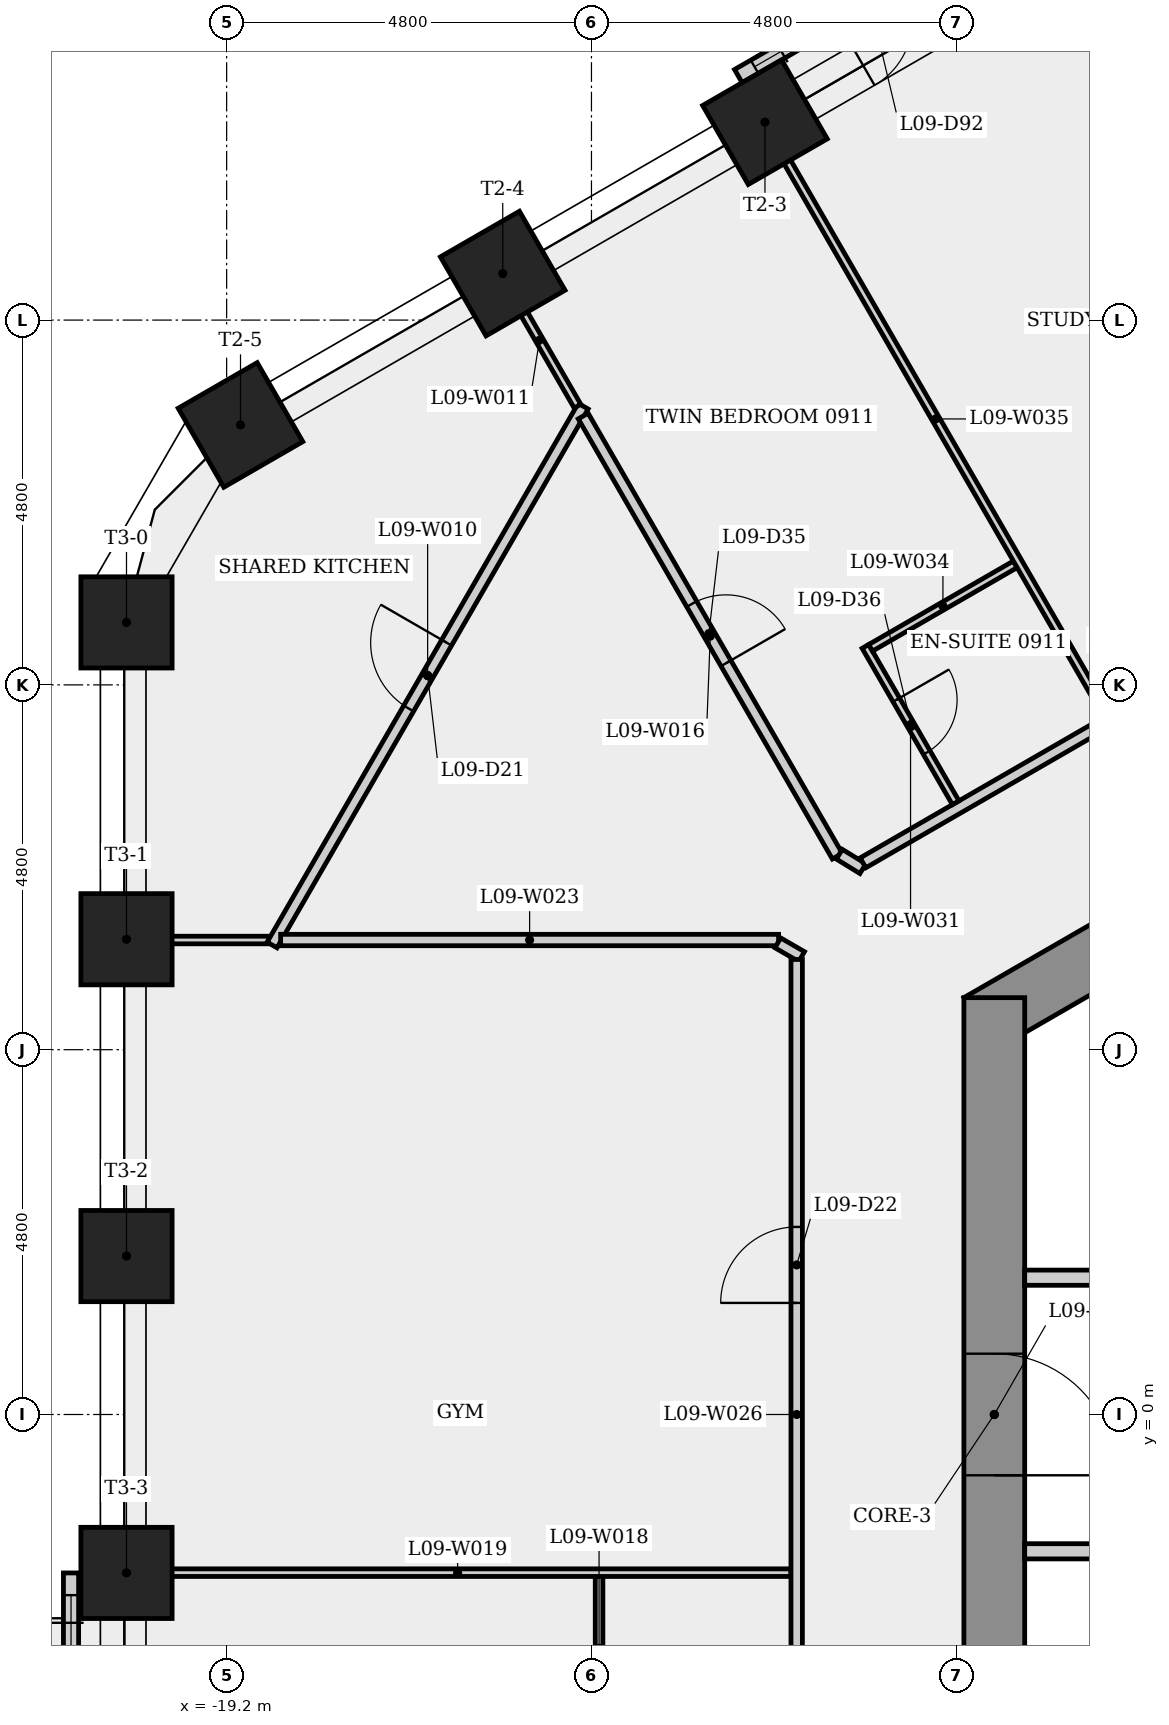
"""IFC4 building model, lengths in metres.
Left out: names, types, materials, properties, quantities, classifications, styles, units other than length and angle.
Written with IfcOpenShell. Run it as: python <this file> out.ifc"""

import sys

from ifc_helpers import new_model, si_unit, direction, frame, frame_2d, origin, origin_2d, place, context, subcontext, project, spatial, rectangle, extrude, element, fill, save


model = new_model("IFC4")
c1 = context("Model", 3, precision=1e-05, world=origin(), true_north=direction((0.0, 1.0)))
c2 = subcontext(c1, "Body", "Model", "MODEL_VIEW")
j1 = project(units=[si_unit("LENGTHUNIT", "METRE"), si_unit("PLANEANGLEUNIT", "RADIAN")], contexts=[c1])
p1 = place(None, origin())
s1 = spatial("IfcSite", under=j1, at=p1, CompositionType="ELEMENT")
p2 = place(p1, origin())
s2 = spatial("IfcBuilding", under=s1, at=p2, CompositionType="ELEMENT")
p3 = place(p2, frame((0.0, 0.0, 39.1)))
s3 = spatial("IfcBuildingStorey", under=s2, at=p3, CompositionType="ELEMENT", Elevation=39.1)
p4 = place(p3, frame((0.2, 10.623, 0.0), z_axis=(0.0, 0.0, 1.0), x_axis=(-0.866023993627, -0.500002442456, 0.0)))
e1 = element("IfcWall", 1, at=p4, inside=s3, PredefinedType="SHEAR", context=c2, shape_type="SweptSolid", body=[
    extrude(rectangle(XDim=10.97, YDim=0.8, at=frame_2d((5.485, 0.0))), origin(), (0.0, 0.0, 1.0), 3.4),
])
p5 = place(p4, frame((6.185, 0.0, 0.0)))
e2 = element("IfcOpeningElement", 2, at=p5, cuts=e1, PredefinedType="OPENING", context=c2, shape_type="SweptSolid", body=[
    extrude(rectangle(XDim=0.9, YDim=2.1, at=frame_2d((0.45, 1.05))), frame((0.0, 0.41, 0.0), z_axis=(0.0, -1.0, 0.0), x_axis=(1.0, 0.0, 0.0)), (0.0, 0.0, 1.0), 0.82),
])
p6 = place(p3, frame((-9.1, 5.485, 0.0), z_axis=(0.0, 0.0, 1.0), x_axis=(0.0, -1.0, 0.0)))
e3 = element("IfcWall", 3, at=p6, inside=s3, PredefinedType="SHEAR", context=c2, shape_type="SweptSolid", body=[
    extrude(rectangle(XDim=10.97, YDim=0.8, at=frame_2d((5.485, 0.0))), origin(), (0.0, 0.0, 1.0), 3.4),
])
p7 = place(p6, frame((4.685, 0.0, 0.0)))
e4 = element("IfcOpeningElement", 4, at=p7, cuts=e3, PredefinedType="OPENING", context=c2, shape_type="SweptSolid", body=[
    extrude(rectangle(XDim=1.6, YDim=2.1, at=frame_2d((0.8, 1.05))), frame((0.0, 0.41, 0.0), z_axis=(0.0, -1.0, 0.0), x_axis=(1.0, 0.0, 0.0)), (0.0, 0.0, 1.0), 0.82),
])
for number, where, z_axis, x_axis in (
    (5, (-12.117, 17.004, 0.0), (0.0, 0.0, 1.0), (-0.5, 0.866, 0.0)),
    (6, (-15.567, 15.012, 0.0), (0.0, 0.0, 1.0), (-0.5, 0.866, 0.0)),
    (7, (-19.018, 13.02, 0.0), (0.0, 0.0, 1.0), (-0.5, 0.866, 0.0)),
    (8, (-20.518, 10.422, 0.0), (0.0, 0.0, 1.0), (-1.0, 0.0, 0.0)),
    (9, (-20.518, 6.253, 0.0), (0.0, 0.0, 1.0), (-1.0, 0.0, 0.0)),
    (10, (-20.518, 2.084, 0.0), (0.0, 0.0, 1.0), (-1.0, 0.0, 0.0)),
    (11, (-20.518, -2.084, 0.0), (0.0, 0.0, 1.0), (-1.0, 0.0, 0.0)),
):
    element("IfcColumn", number, at=place(p3, frame(where, z_axis=z_axis, x_axis=x_axis)), inside=s3, PredefinedType="COLUMN", context=c2, shape_type="SweptSolid", body=[
        extrude(rectangle(XDim=1.2, YDim=1.2, at=origin_2d()), origin(), (0.0, 0.0, 1.0), 3.4),
    ])
p8 = place(p3, frame((-9.017, 19.602, 0.0), z_axis=(0.0, 0.0, 1.0), x_axis=(-0.866017214255, -0.500014184414, 0.0)))
e12 = element("IfcWall", 12, at=p8, inside=s3, PredefinedType="SOLIDWALL", context=c2, shape_type="SweptSolid", body=[
    extrude(rectangle(XDim=3.984, YDim=0.2, at=frame_2d((1.992, 0.0))), origin(), (0.0, 0.0, 1.0), 3.4),
])
p9 = place(p8, frame((1.492, 0.0, 0.0)))
e13 = element("IfcOpeningElement", 13, at=p9, cuts=e12, PredefinedType="OPENING", context=c2, shape_type="SweptSolid", body=[
    extrude(rectangle(XDim=1.0, YDim=2.4, at=frame_2d((0.5, 1.2))), frame((0.0, 0.11, 0.0), z_axis=(0.0, -1.0, 0.0), x_axis=(1.0, 0.0, 0.0)), (0.0, 0.0, 1.0), 0.22),
])
p10 = place(p8, frame((0.246, 0.0, 0.9)))
e14 = element("IfcOpeningElement", 14, at=p10, cuts=e12, PredefinedType="OPENING", context=c2, shape_type="SweptSolid", body=[
    extrude(rectangle(XDim=1.0, YDim=1.5, at=frame_2d((0.5, 0.75))), frame((0.0, 0.11, 0.0), z_axis=(0.0, -1.0, 0.0), x_axis=(1.0, 0.0, 0.0)), (0.0, 0.0, 1.0), 0.22),
])
p11 = place(p8, frame((2.738, 0.0, 0.9)))
e15 = element("IfcOpeningElement", 15, at=p11, cuts=e12, PredefinedType="OPENING", context=c2, shape_type="SweptSolid", body=[
    extrude(rectangle(XDim=1.0, YDim=1.5, at=frame_2d((0.5, 0.75))), frame((0.0, 0.11, 0.0), z_axis=(0.0, -1.0, 0.0), x_axis=(1.0, 0.0, 0.0)), (0.0, 0.0, 1.0), 0.22),
])
p12 = place(p3, frame((-21.247, -2.085, 0.0), z_axis=(0.0, 0.0, 1.0), x_axis=(0.0, -1.0, 0.0)))
e16 = element("IfcWall", 16, at=p12, inside=s3, PredefinedType="SOLIDWALL", context=c2, shape_type="SweptSolid", body=[
    extrude(rectangle(XDim=4.168, YDim=0.2, at=frame_2d((2.084, 0.0))), origin(), (0.0, 0.0, 1.0), 3.4),
])
p13 = place(p12, frame((1.584, 0.0, 0.0)))
e17 = element("IfcOpeningElement", 17, at=p13, cuts=e16, PredefinedType="OPENING", context=c2, shape_type="SweptSolid", body=[
    extrude(rectangle(XDim=1.0, YDim=2.4, at=frame_2d((0.5, 1.2))), frame((0.0, 0.11, 0.0), z_axis=(0.0, -1.0, 0.0), x_axis=(1.0, 0.0, 0.0)), (0.0, 0.0, 1.0), 0.22),
])
p14 = place(p12, frame((0.292, 0.0, 0.9)))
e18 = element("IfcOpeningElement", 18, at=p14, cuts=e16, PredefinedType="OPENING", context=c2, shape_type="SweptSolid", body=[
    extrude(rectangle(XDim=1.0, YDim=1.5, at=frame_2d((0.5, 0.75))), frame((0.0, 0.11, 0.0), z_axis=(0.0, -1.0, 0.0), x_axis=(1.0, 0.0, 0.0)), (0.0, 0.0, 1.0), 0.22),
])
p15 = place(p12, frame((2.876, 0.0, 0.9)))
e19 = element("IfcOpeningElement", 19, at=p15, cuts=e16, PredefinedType="OPENING", context=c2, shape_type="SweptSolid", body=[
    extrude(rectangle(XDim=1.0, YDim=1.5, at=frame_2d((0.5, 0.75))), frame((0.0, 0.11, 0.0), z_axis=(0.0, -1.0, 0.0), x_axis=(1.0, 0.0, 0.0)), (0.0, 0.0, 1.0), 0.22),
])
p16 = place(p3, frame((-18.639, 6.243, 0.0), z_axis=(0.0, 0.0, 1.0), x_axis=(-1.0, 0.0, 0.0)))
e20 = element("IfcWall", 20, at=p16, inside=s3, PredefinedType="PARTITIONING", context=c2, shape_type="SweptSolid", body=[
    extrude(rectangle(XDim=1.908, YDim=0.1, at=frame_2d((0.954, 0.0))), origin(), (0.0, 0.0, 1.0), 3.05),
])
p17 = place(p3, frame((-18.602, 6.178, 0.0), z_axis=(0.0, 0.0, 1.0), x_axis=(0.500007281186, 0.866021199949, 0.0)))
e21 = element("IfcWall", 21, at=p17, inside=s3, PredefinedType="PARTITIONING", context=c2, shape_type="SweptSolid", body=[
    extrude(rectangle(XDim=8.187, YDim=0.15, at=frame_2d((4.093, 0.0))), origin(), (0.0, 0.0, 1.0), 3.05),
])
p18 = place(p17, frame((3.593, 0.0, 0.0)))
e22 = element("IfcOpeningElement", 22, at=p18, cuts=e21, PredefinedType="OPENING", context=c2, shape_type="SweptSolid", body=[
    extrude(rectangle(XDim=1.0, YDim=2.1, at=frame_2d((0.5, 1.05))), frame((0.0, 0.085, 0.0), z_axis=(0.0, -1.0, 0.0), x_axis=(1.0, 0.0, 0.0)), (0.0, 0.0, 1.0), 0.17),
])
p19 = place(p3, frame((-15.585, 15.002, 0.0), z_axis=(0.0, 0.0, 1.0), x_axis=(0.500007410291, -0.866021125408, 0.0)))
e23 = element("IfcWall", 23, at=p19, inside=s3, PredefinedType="PARTITIONING", context=c2, shape_type="SweptSolid", body=[
    extrude(rectangle(XDim=2.002, YDim=0.1, at=frame_2d((1.001, 0.0))), origin(), (0.0, 0.0, 1.0), 3.05),
])
p20 = place(p3, frame((-14.509, 13.138, 0.0), z_axis=(0.0, 0.0, 1.0), x_axis=(0.499975272495, -0.866039679746, 0.0)))
e24 = element("IfcWall", 24, at=p20, inside=s3, PredefinedType="PARTITIONING", context=c2, shape_type="SweptSolid", body=[
    extrude(rectangle(XDim=6.687, YDim=0.15, at=frame_2d((3.344, 0.0))), origin(), (0.0, 0.0, 1.0), 3.05),
])
p21 = place(p20, frame((2.856, 0.0, 0.0)))
e25 = element("IfcOpeningElement", 25, at=p21, cuts=e24, PredefinedType="OPENING", context=c2, shape_type="SweptSolid", body=[
    extrude(rectangle(XDim=0.9, YDim=2.1, at=frame_2d((0.45, 1.05))), frame((0.0, 0.085, 0.0), z_axis=(0.0, -1.0, 0.0), x_axis=(1.0, 0.0, 0.0)), (0.0, 0.0, 1.0), 0.17),
])
p22 = place(p3, frame((-14.3, -2.131, 0.0), z_axis=(0.0, 0.0, 1.0), x_axis=(0.0, -1.0, 0.0)))
e26 = element("IfcWall", 26, at=p22, inside=s3, PredefinedType="PARTITIONING", context=c2, shape_type="SweptSolid", body=[
    extrude(rectangle(XDim=2.362, YDim=0.1, at=frame_2d((1.181, 0.0))), origin(), (0.0, 0.0, 1.0), 3.05),
])
p23 = place(p3, frame((-20.547, -2.081, 0.0), z_axis=(0.0, 0.0, 1.0), x_axis=(1.0, 0.0, 0.0)))
e27 = element("IfcWall", 27, at=p23, inside=s3, PredefinedType="PARTITIONING", context=c2, shape_type="SweptSolid", body=[
    extrude(rectangle(XDim=8.772, YDim=0.1, at=frame_2d((4.386, 0.0))), origin(), (0.0, 0.0, 1.0), 3.05),
])
p24 = place(p3, frame((-11.938, 6.243, 0.0), z_axis=(0.0, 0.0, 1.0), x_axis=(-1.0, 0.0, 0.0)))
e28 = element("IfcWall", 28, at=p24, inside=s3, PredefinedType="PARTITIONING", context=c2, shape_type="SweptSolid", body=[
    extrude(rectangle(XDim=6.551, YDim=0.15, at=frame_2d((3.276, 0.0))), origin(), (0.0, 0.0, 1.0), 3.05),
])
p25 = place(p3, frame((-11.635, 6.025, 0.0), z_axis=(0.0, 0.0, 1.0), x_axis=(-0.865949522258, 0.500131407633, 0.0)))
e29 = element("IfcWall", 29, at=p25, inside=s3, PredefinedType="PARTITIONING", context=c2, shape_type="SweptSolid", body=[
    extrude(rectangle(XDim=0.362, YDim=0.15, at=frame_2d((0.181, 0.0))), origin(), (0.0, 0.0, 1.0), 3.05),
])
p26 = place(p3, frame((-11.7, -5.987, 0.0), z_axis=(0.0, 0.0, 1.0), x_axis=(0.0, 1.0, 0.0)))
e30 = element("IfcWall", 30, at=p26, inside=s3, PredefinedType="PARTITIONING", context=c2, shape_type="SweptSolid", body=[
    extrude(rectangle(XDim=11.975, YDim=0.15, at=frame_2d((5.987, 0.0))), origin(), (0.0, 0.0, 1.0), 3.05),
])
p27 = place(p26, frame((7.455, 0.0, 0.0)))
e31 = element("IfcOpeningElement", 31, at=p27, cuts=e30, PredefinedType="OPENING", context=c2, shape_type="SweptSolid", body=[
    extrude(rectangle(XDim=1.0, YDim=2.1, at=frame_2d((0.5, 1.05))), frame((0.0, 0.085, 0.0), z_axis=(0.0, -1.0, 0.0), x_axis=(1.0, 0.0, 0.0)), (0.0, 0.0, 1.0), 0.17),
])
p28 = place(p3, frame((-11.139, 7.372, 0.0), z_axis=(0.0, 0.0, 1.0), x_axis=(0.852601252411, -0.522562057929, 0.0)))
e32 = element("IfcWall", 32, at=p28, inside=s3, PredefinedType="PARTITIONING", context=c2, shape_type="SweptSolid", body=[
    extrude(rectangle(XDim=0.364, YDim=0.15, at=frame_2d((0.182, 0.0))), origin(), (0.0, 0.0, 1.0), 3.05),
])
p29 = place(p3, frame((-10.828, 7.259, 0.0), z_axis=(0.0, 0.0, 1.0), x_axis=(0.866023917287, 0.50000257468, 0.0)))
e33 = element("IfcWall", 33, at=p29, inside=s3, PredefinedType="PARTITIONING", context=c2, shape_type="SweptSolid", body=[
    extrude(rectangle(XDim=11.744, YDim=0.15, at=frame_2d((5.872, 0.0))), origin(), (0.0, 0.0, 1.0), 3.05),
])
p30 = place(p29, frame((5.887, 0.0, 0.0)))
e34 = element("IfcOpeningElement", 34, at=p30, cuts=e33, PredefinedType="OPENING", context=c2, shape_type="SweptSolid", body=[
    extrude(rectangle(XDim=1.0, YDim=2.1, at=frame_2d((0.5, 1.05))), frame((0.0, 0.085, 0.0), z_axis=(0.0, -1.0, 0.0), x_axis=(1.0, 0.0, 0.0)), (0.0, 0.0, 1.0), 0.17),
])
p31 = place(p3, frame((-10.796, 10.106, 0.0), z_axis=(0.0, 0.0, 1.0), x_axis=(0.499986429846, -0.866033238375, 0.0)))
e35 = element("IfcWall", 35, at=p31, inside=s3, PredefinedType="PARTITIONING", context=c2, shape_type="SweptSolid", body=[
    extrude(rectangle(XDim=2.375, YDim=0.1, at=frame_2d((1.188, 0.0))), origin(), (0.0, 0.0, 1.0), 3.05),
])
p32 = place(p31, frame((0.812, 0.0, 0.0)))
e36 = element("IfcOpeningElement", 36, at=p32, cuts=e35, PredefinedType="OPENING", context=c2, shape_type="SweptSolid", body=[
    extrude(rectangle(XDim=0.8, YDim=2.1, at=frame_2d((0.4, 1.05))), frame((0.0, 0.06, 0.0), z_axis=(0.0, -1.0, 0.0), x_axis=(1.0, 0.0, 0.0)), (0.0, 0.0, 1.0), 0.12),
])
p33 = place(p3, frame((-8.824, 11.187, 0.0), z_axis=(0.0, 0.0, 1.0), x_axis=(-0.866046828231, -0.499962889934, 0.0)))
e37 = element("IfcWall", 37, at=p33, inside=s3, PredefinedType="PARTITIONING", context=c2, shape_type="SweptSolid", body=[
    extrude(rectangle(XDim=2.198, YDim=0.1, at=frame_2d((1.099, 0.0))), origin(), (0.0, 0.0, 1.0), 3.05),
])
p34 = place(p3, frame((-12.123, 17.0, 0.0), z_axis=(0.0, 0.0, 1.0), x_axis=(0.500009404554, -0.866019973994, 0.0)))
e38 = element("IfcWall", 38, at=p34, inside=s3, PredefinedType="PARTITIONING", context=c2, shape_type="SweptSolid", body=[
    extrude(rectangle(XDim=9.01, YDim=0.1, at=frame_2d((4.505, 0.0))), origin(), (0.0, 0.0, 1.0), 3.05),
])
for number, where, z_axis, x_axis in (
    (39, (-8.7, 1.8, 0.0), (0.0, 0.0, 1.0), (1.0, 0.0, 0.0)),
    (40, (-7.475, -1.8, 0.0), (0.0, 0.0, 1.0), (-1.0, 0.0, 0.0)),
):
    element("IfcWall", number, at=place(p3, frame(where, z_axis=z_axis, x_axis=x_axis)), inside=s3, PredefinedType="PARTITIONING", context=c2, shape_type="SweptSolid", body=[
        extrude(rectangle(XDim=1.225, YDim=0.2, at=frame_2d((0.613, 0.0))), origin(), (0.0, 0.0, 1.0), 3.05),
    ])
p35 = place(p3, frame((-3.049, 11.836, 0.0), z_axis=(0.0, 0.0, 1.0), x_axis=(-0.500018000043, 0.866015011206, 0.0)))
e41 = element("IfcWall", 41, at=p35, inside=s3, PredefinedType="PARTITIONING", context=c2, shape_type="SweptSolid", body=[
    extrude(rectangle(XDim=9.606, YDim=0.1, at=frame_2d((4.803, 0.0))), origin(), (0.0, 0.0, 1.0), 3.05),
])
p36 = place(p11, origin())
e42 = element("IfcWindow", 42, at=p36, inside=s3, PartitioningType="SINGLE_PANEL", PredefinedType="WINDOW", context=c2, shape_type="SweptSolid", body=[
    extrude(rectangle(XDim=1.0, YDim=1.5, at=frame_2d((0.5, 0.75))), frame((0.0, 0.03, 0.0), z_axis=(0.0, -1.0, 0.0), x_axis=(1.0, 0.0, 0.0)), (0.0, 0.0, 1.0), 0.06),
])
fill(e15, e42)
p37 = place(p14, origin())
e43 = element("IfcWindow", 43, at=p37, inside=s3, PartitioningType="SINGLE_PANEL", PredefinedType="WINDOW", context=c2, shape_type="SweptSolid", body=[
    extrude(rectangle(XDim=1.0, YDim=1.5, at=frame_2d((0.5, 0.75))), frame((0.0, 0.03, 0.0), z_axis=(0.0, -1.0, 0.0), x_axis=(1.0, 0.0, 0.0)), (0.0, 0.0, 1.0), 0.06),
])
fill(e18, e43)
p38 = place(p18, origin())
e44 = element("IfcDoor", 44, at=p38, inside=s3, OperationType="SINGLE_SWING_RIGHT", PredefinedType="DOOR", context=c2, shape_type="SweptSolid", body=[
    extrude(rectangle(XDim=1.0, YDim=2.1, at=frame_2d((0.5, 1.05))), frame((0.0, 0.025, 0.0), z_axis=(0.0, -1.0, 0.0), x_axis=(1.0, 0.0, 0.0)), (0.0, 0.0, 1.0), 0.05),
])
fill(e22, e44)
p39 = place(p27, origin())
e45 = element("IfcDoor", 45, at=p39, inside=s3, OperationType="SINGLE_SWING_LEFT", PredefinedType="DOOR", context=c2, shape_type="SweptSolid", body=[
    extrude(rectangle(XDim=1.0, YDim=2.1, at=frame_2d((0.5, 1.05))), frame((0.0, 0.025, 0.0), z_axis=(0.0, -1.0, 0.0), x_axis=(1.0, 0.0, 0.0)), (0.0, 0.0, 1.0), 0.05),
])
fill(e31, e45)
p40 = place(p21, origin())
e46 = element("IfcDoor", 46, at=p40, inside=s3, OperationType="SINGLE_SWING_RIGHT", PredefinedType="DOOR", context=c2, shape_type="SweptSolid", body=[
    extrude(rectangle(XDim=0.9, YDim=2.1, at=frame_2d((0.45, 1.05))), frame((0.0, 0.025, 0.0), z_axis=(0.0, -1.0, 0.0), x_axis=(1.0, 0.0, 0.0)), (0.0, 0.0, 1.0), 0.05),
])
fill(e25, e46)
p41 = place(p32, origin())
e47 = element("IfcDoor", 47, at=p41, inside=s3, OperationType="SINGLE_SWING_LEFT", PredefinedType="DOOR", context=c2, shape_type="SweptSolid", body=[
    extrude(rectangle(XDim=0.8, YDim=2.1, at=frame_2d((0.4, 1.05))), frame((0.0, 0.025, 0.0), z_axis=(0.0, -1.0, 0.0), x_axis=(1.0, 0.0, 0.0)), (0.0, 0.0, 1.0), 0.05),
])
fill(e36, e47)
p42 = place(p7, origin())
e48 = element("IfcDoor", 48, at=p42, inside=s3, OperationType="SINGLE_SWING_RIGHT", PredefinedType="DOOR", context=c2, shape_type="SweptSolid", body=[
    extrude(rectangle(XDim=1.6, YDim=2.1, at=frame_2d((0.8, 1.05))), frame((0.0, 0.025, 0.0), z_axis=(0.0, -1.0, 0.0), x_axis=(1.0, 0.0, 0.0)), (0.0, 0.0, 1.0), 0.05),
])
fill(e4, e48)
save(model, sys.argv[1])
